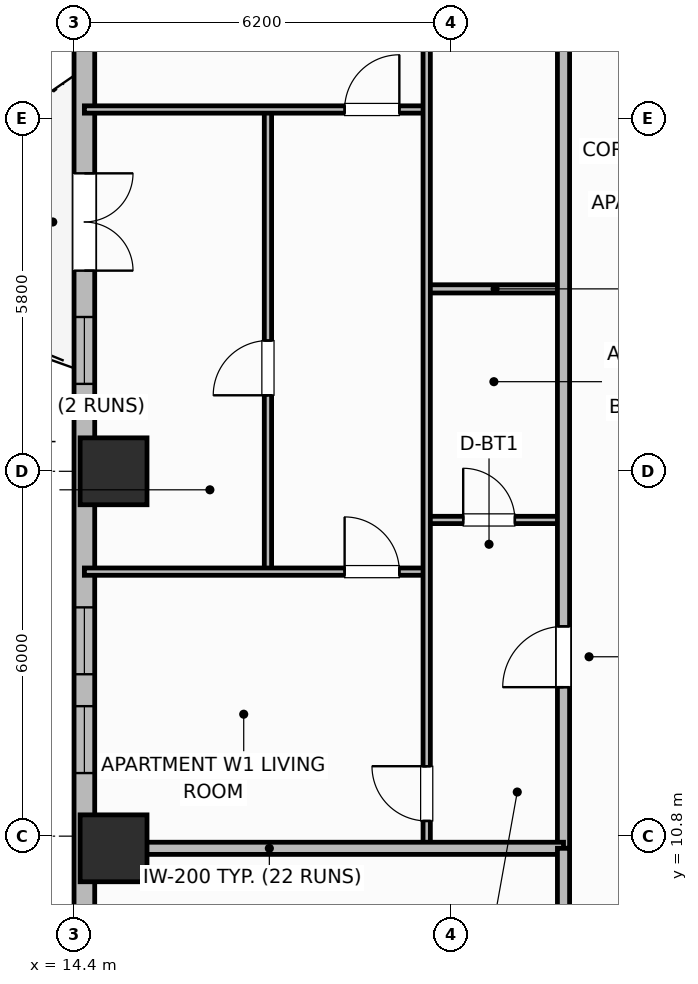
"""IFC4 building model, lengths in metres.
Left out: names, types, materials, properties, quantities, classifications, styles, units other than length and angle.
Written with IfcOpenShell. Run it as: python <this file> out.ifc"""

import sys

from ifc_helpers import new_model, si_unit, direction, frame, frame_2d, origin, origin_2d, place, context, subcontext, project, spatial, rectangle, extrude, element, fill, save


model = new_model("IFC4")
c1 = context("Model", 3, precision=1e-05, world=origin(), true_north=direction((0.0, 1.0)))
c2 = subcontext(c1, "Body", "Model", "MODEL_VIEW")
j1 = project(units=[si_unit("LENGTHUNIT", "METRE"), si_unit("PLANEANGLEUNIT", "RADIAN")], contexts=[c1])
p1 = place(None, origin())
s1 = spatial("IfcSite", under=j1, at=p1, CompositionType="ELEMENT")
p2 = place(p1, origin())
s2 = spatial("IfcBuilding", under=s1, at=p2, CompositionType="ELEMENT")
p3 = place(p2, frame((0.0, 0.0, 132.7)))
s3 = spatial("IfcBuildingStorey", under=s2, at=p3, CompositionType="ELEMENT", Elevation=132.7)
for number, where, z_axis, x_axis in (
    (1, (15.05, 10.6, 0.0), (0.0, 0.0, 1.0), (1.0, 0.0, 0.0)),
    (2, (15.05, 16.8, 0.0), (0.0, 0.0, 1.0), (1.0, 0.0, 0.0)),
):
    element("IfcColumn", number, at=place(p3, frame(where, z_axis=z_axis, x_axis=x_axis)), inside=s3, PredefinedType="COLUMN", context=c2, shape_type="SweptSolid", body=[
        extrude(rectangle(XDim=1.1, YDim=1.1, at=origin_2d()), origin(), (0.0, 0.0, 1.0), 3.7),
    ])
p4 = place(p3, frame((14.57, 23.8, 0.0), z_axis=(0.0, 0.0, 1.0), x_axis=(0.0, -1.0, 0.0)))
e3 = element("IfcWall", 3, at=p4, inside=s3, PredefinedType="SOLIDWALL", context=c2, shape_type="SweptSolid", body=[
    extrude(rectangle(XDim=14.8, YDim=0.34, at=frame_2d((7.4, 0.0))), origin(), (0.0, 0.0, 1.0), 2.66),
])
p5 = place(p4, frame((2.1, 0.0, 0.0)))
e4 = element("IfcOpeningElement", 4, at=p5, cuts=e3, PredefinedType="OPENING", context=c2, shape_type="SweptSolid", body=[
    extrude(rectangle(XDim=1.6, YDim=2.1, at=frame_2d((0.8, 1.05))), frame((0.0, 0.18, 0.0), z_axis=(0.0, -1.0, 0.0), x_axis=(1.0, 0.0, 0.0)), (0.0, 0.0, 1.0), 0.36),
])
p6 = place(p4, frame((4.462, 0.0, 0.89)))
e5 = element("IfcOpeningElement", 5, at=p6, cuts=e3, PredefinedType="OPENING", context=c2, shape_type="SweptSolid", body=[
    extrude(rectangle(XDim=1.1, YDim=1.65, at=frame_2d((0.55, 0.825))), frame((0.0, 0.18, 0.0), z_axis=(0.0, -1.0, 0.0), x_axis=(1.0, 0.0, 0.0)), (0.0, 0.0, 1.0), 0.36),
])
p7 = place(p4, frame((9.238, 0.0, 0.89)))
e6 = element("IfcOpeningElement", 6, at=p7, cuts=e3, PredefinedType="OPENING", context=c2, shape_type="SweptSolid", body=[
    extrude(rectangle(XDim=1.1, YDim=1.65, at=frame_2d((0.55, 0.825))), frame((0.0, 0.18, 0.0), z_axis=(0.0, -1.0, 0.0), x_axis=(1.0, 0.0, 0.0)), (0.0, 0.0, 1.0), 0.36),
])
p8 = place(p4, frame((10.863, 0.0, 0.89)))
e7 = element("IfcOpeningElement", 7, at=p8, cuts=e3, PredefinedType="OPENING", context=c2, shape_type="SweptSolid", body=[
    extrude(rectangle(XDim=1.1, YDim=1.65, at=frame_2d((0.55, 0.825))), frame((0.0, 0.18, 0.0), z_axis=(0.0, -1.0, 0.0), x_axis=(1.0, 0.0, 0.0)), (0.0, 0.0, 1.0), 0.36),
])
p9 = place(p3, frame((20.2, 16.0, 0.0), z_axis=(0.0, 0.0, 1.0), x_axis=(1.0, 0.0, 0.0)))
e8 = element("IfcWall", 8, at=p9, inside=s3, PredefinedType="PARTITIONING", context=c2, shape_type="SweptSolid", body=[
    extrude(rectangle(XDim=2.25, YDim=0.12, at=frame_2d((1.125, 0.0))), origin(), (0.0, 0.0, 1.0), 2.49),
])
p10 = place(p9, frame((0.6, 0.0, 0.0)))
e9 = element("IfcOpeningElement", 9, at=p10, cuts=e8, PredefinedType="OPENING", context=c2, shape_type="SweptSolid", body=[
    extrude(rectangle(XDim=0.85, YDim=2.1, at=frame_2d((0.425, 1.05))), frame((0.0, 0.07, 0.0), z_axis=(0.0, -1.0, 0.0), x_axis=(1.0, 0.0, 0.0)), (0.0, 0.0, 1.0), 0.14),
])
p11 = place(p3, frame((20.2, 19.8, 0.0), z_axis=(0.0, 0.0, 1.0), x_axis=(1.0, 0.0, 0.0)))
e10 = element("IfcWall", 10, at=p11, inside=s3, PredefinedType="PARTITIONING", context=c2, shape_type="SweptSolid", body=[
    extrude(rectangle(XDim=2.25, YDim=0.135, at=frame_2d((1.125, 0.0))), origin(), (0.0, 0.0, 1.0), 2.49),
])
p12 = place(p3, frame((17.589, 15.19, 0.0), z_axis=(0.0, 0.0, 1.0), x_axis=(0.0, 1.0, 0.0)))
e11 = element("IfcWall", 11, at=p12, inside=s3, PredefinedType="PARTITIONING", context=c2, shape_type="SweptSolid", body=[
    extrude(rectangle(XDim=7.52, YDim=0.12, at=frame_2d((3.76, 0.0))), origin(), (0.0, 0.0, 1.0), 2.49),
])
p13 = place(p12, frame((2.86, 0.0, 0.0)))
e12 = element("IfcOpeningElement", 12, at=p13, cuts=e11, PredefinedType="OPENING", context=c2, shape_type="SweptSolid", body=[
    extrude(rectangle(XDim=0.9, YDim=2.1, at=frame_2d((0.45, 1.05))), frame((0.0, 0.07, 0.0), z_axis=(0.0, -1.0, 0.0), x_axis=(1.0, 0.0, 0.0)), (0.0, 0.0, 1.0), 0.14),
])
p14 = place(p3, frame((14.57, 15.15, 0.0), z_axis=(0.0, 0.0, 1.0), x_axis=(1.0, 0.0, 0.0)))
e13 = element("IfcWall", 13, at=p14, inside=s3, PredefinedType="PARTITIONING", context=c2, shape_type="SweptSolid", body=[
    extrude(rectangle(XDim=5.63, YDim=0.12, at=frame_2d((2.815, 0.0))), origin(), (0.0, 0.0, 1.0), 2.49),
])
p15 = place(p14, frame((4.28, 0.0, 0.0)))
e14 = element("IfcOpeningElement", 14, at=p15, cuts=e13, PredefinedType="OPENING", context=c2, shape_type="SweptSolid", body=[
    extrude(rectangle(XDim=0.9, YDim=2.1, at=frame_2d((0.45, 1.05))), frame((0.0, 0.07, 0.0), z_axis=(0.0, -1.0, 0.0), x_axis=(1.0, 0.0, 0.0)), (0.0, 0.0, 1.0), 0.14),
])
p16 = place(p3, frame((14.57, 22.75, 0.0), z_axis=(0.0, 0.0, 1.0), x_axis=(1.0, 0.0, 0.0)))
e15 = element("IfcWall", 15, at=p16, inside=s3, PredefinedType="PARTITIONING", context=c2, shape_type="SweptSolid", body=[
    extrude(rectangle(XDim=5.63, YDim=0.12, at=frame_2d((2.815, 0.0))), origin(), (0.0, 0.0, 1.0), 2.49),
])
p17 = place(p16, frame((4.28, 0.0, 0.0)))
e16 = element("IfcOpeningElement", 16, at=p17, cuts=e15, PredefinedType="OPENING", context=c2, shape_type="SweptSolid", body=[
    extrude(rectangle(XDim=0.9, YDim=2.1, at=frame_2d((0.45, 1.05))), frame((0.0, 0.07, 0.0), z_axis=(0.0, -1.0, 0.0), x_axis=(1.0, 0.0, 0.0)), (0.0, 0.0, 1.0), 0.14),
])
p18 = place(p3, frame((20.2, 10.64, 0.0), z_axis=(0.0, 0.0, 1.0), x_axis=(0.0, 1.0, 0.0)))
e17 = element("IfcWall", 17, at=p18, inside=s3, PredefinedType="PARTITIONING", context=c2, shape_type="SweptSolid", body=[
    extrude(rectangle(XDim=15.92, YDim=0.12, at=frame_2d((7.96, 0.0))), origin(), (0.0, 0.0, 1.0), 2.49),
])
p19 = place(p18, frame((0.41, 0.0, 0.0)))
e18 = element("IfcOpeningElement", 18, at=p19, cuts=e17, PredefinedType="OPENING", context=c2, shape_type="SweptSolid", body=[
    extrude(rectangle(XDim=0.9, YDim=2.1, at=frame_2d((0.45, 1.05))), frame((0.0, 0.07, 0.0), z_axis=(0.0, -1.0, 0.0), x_axis=(1.0, 0.0, 0.0)), (0.0, 0.0, 1.0), 0.14),
])
p20 = place(p18, frame((13.125, 0.0, 0.0)))
e19 = element("IfcOpeningElement", 19, at=p20, cuts=e17, PredefinedType="OPENING", context=c2, shape_type="SweptSolid", body=[
    extrude(rectangle(XDim=0.82, YDim=2.08, at=frame_2d((0.41, 1.04))), frame((0.0, 0.07, 0.0), z_axis=(0.0, -1.0, 0.0), x_axis=(1.0, 0.0, 0.0)), (0.0, 0.0, 1.0), 0.14),
])
p21 = place(p3, frame((22.45, 10.6, 0.0), z_axis=(0.0, 0.0, 1.0), x_axis=(0.0, 1.0, 0.0)))
e20 = element("IfcWall", 20, at=p21, inside=s3, PredefinedType="PARTITIONING", context=c2, shape_type="SweptSolid", body=[
    extrude(rectangle(XDim=35.2, YDim=0.2, at=frame_2d((17.6, 0.0))), origin(), (0.0, 0.0, 1.0), 2.49),
])
p22 = place(p21, frame((2.65, 0.0, 0.0)))
e21 = element("IfcOpeningElement", 21, at=p22, cuts=e20, PredefinedType="OPENING", context=c2, shape_type="SweptSolid", body=[
    extrude(rectangle(XDim=1.0, YDim=2.15, at=frame_2d((0.5, 1.075))), frame((0.0, 0.11, 0.0), z_axis=(0.0, -1.0, 0.0), x_axis=(1.0, 0.0, 0.0)), (0.0, 0.0, 1.0), 0.22),
])
p23 = place(p21, frame((19.95, 0.0, 0.0)))
e22 = element("IfcOpeningElement", 22, at=p23, cuts=e20, PredefinedType="OPENING", context=c2, shape_type="SweptSolid", body=[
    extrude(rectangle(XDim=1.0, YDim=2.15, at=frame_2d((0.5, 1.075))), frame((0.0, 0.11, 0.0), z_axis=(0.0, -1.0, 0.0), x_axis=(1.0, 0.0, 0.0)), (0.0, 0.0, 1.0), 0.22),
])
p24 = place(p3, frame((14.99, 10.6, 0.0), z_axis=(0.0, 0.0, 1.0), x_axis=(1.0, 0.0, 0.0)))
e23 = element("IfcWall", 23, at=p24, inside=s3, PredefinedType="PARTITIONING", context=c2, shape_type="SweptSolid", body=[
    extrude(rectangle(XDim=7.46, YDim=0.2, at=frame_2d((3.73, 0.0))), origin(), (0.0, 0.0, 1.0), 2.49),
])
p25 = place(p3, frame((22.45, 4.97, 0.0), z_axis=(0.0, 0.0, 1.0), x_axis=(0.0, 1.0, 0.0)))
e24 = element("IfcWall", 24, at=p25, inside=s3, PredefinedType="PARTITIONING", context=c2, shape_type="SweptSolid", body=[
    extrude(rectangle(XDim=5.63, YDim=0.2, at=frame_2d((2.815, 0.0))), origin(), (0.0, 0.0, 1.0), 2.49),
])
p26 = place(p5, origin())
e25 = element("IfcDoor", 25, at=p26, inside=s3, OperationType="DOUBLE_DOOR_SINGLE_SWING", PredefinedType="DOOR", context=c2, shape_type="SweptSolid", body=[
    extrude(rectangle(XDim=1.6, YDim=2.1, at=frame_2d((0.8, 1.05))), frame((0.0, 0.025, 0.0), z_axis=(0.0, -1.0, 0.0), x_axis=(1.0, 0.0, 0.0)), (0.0, 0.0, 1.0), 0.05),
])
fill(e4, e25)
p27 = place(p6, origin())
e26 = element("IfcWindow", 26, at=p27, inside=s3, PartitioningType="SINGLE_PANEL", PredefinedType="WINDOW", context=c2, shape_type="SweptSolid", body=[
    extrude(rectangle(XDim=1.1, YDim=1.65, at=frame_2d((0.55, 0.825))), frame((0.0, 0.03, 0.0), z_axis=(0.0, -1.0, 0.0), x_axis=(1.0, 0.0, 0.0)), (0.0, 0.0, 1.0), 0.06),
])
fill(e5, e26)
p28 = place(p7, origin())
e27 = element("IfcWindow", 27, at=p28, inside=s3, PartitioningType="SINGLE_PANEL", PredefinedType="WINDOW", context=c2, shape_type="SweptSolid", body=[
    extrude(rectangle(XDim=1.1, YDim=1.65, at=frame_2d((0.55, 0.825))), frame((0.0, 0.03, 0.0), z_axis=(0.0, -1.0, 0.0), x_axis=(1.0, 0.0, 0.0)), (0.0, 0.0, 1.0), 0.06),
])
fill(e6, e27)
p29 = place(p8, origin())
e28 = element("IfcWindow", 28, at=p29, inside=s3, PartitioningType="SINGLE_PANEL", PredefinedType="WINDOW", context=c2, shape_type="SweptSolid", body=[
    extrude(rectangle(XDim=1.1, YDim=1.65, at=frame_2d((0.55, 0.825))), frame((0.0, 0.03, 0.0), z_axis=(0.0, -1.0, 0.0), x_axis=(1.0, 0.0, 0.0)), (0.0, 0.0, 1.0), 0.06),
])
fill(e7, e28)
p30 = place(p10, origin())
e29 = element("IfcDoor", 29, at=p30, inside=s3, OperationType="SINGLE_SWING_LEFT", PredefinedType="DOOR", context=c2, shape_type="SweptSolid", body=[
    extrude(rectangle(XDim=0.85, YDim=2.1, at=frame_2d((0.425, 1.05))), frame((0.0, 0.025, 0.0), z_axis=(0.0, -1.0, 0.0), x_axis=(1.0, 0.0, 0.0)), (0.0, 0.0, 1.0), 0.05),
])
fill(e9, e29)
p31 = place(p13, origin())
e30 = element("IfcDoor", 30, at=p31, inside=s3, OperationType="SINGLE_SWING_LEFT", PredefinedType="DOOR", context=c2, shape_type="SweptSolid", body=[
    extrude(rectangle(XDim=0.9, YDim=2.1, at=frame_2d((0.45, 1.05))), frame((0.0, 0.025, 0.0), z_axis=(0.0, -1.0, 0.0), x_axis=(1.0, 0.0, 0.0)), (0.0, 0.0, 1.0), 0.05),
])
fill(e12, e30)
p32 = place(p15, origin())
e31 = element("IfcDoor", 31, at=p32, inside=s3, OperationType="SINGLE_SWING_LEFT", PredefinedType="DOOR", context=c2, shape_type="SweptSolid", body=[
    extrude(rectangle(XDim=0.9, YDim=2.1, at=frame_2d((0.45, 1.05))), frame((0.0, 0.025, 0.0), z_axis=(0.0, -1.0, 0.0), x_axis=(1.0, 0.0, 0.0)), (0.0, 0.0, 1.0), 0.05),
])
fill(e14, e31)
p33 = place(p17, origin())
e32 = element("IfcDoor", 32, at=p33, inside=s3, OperationType="SINGLE_SWING_RIGHT", PredefinedType="DOOR", context=c2, shape_type="SweptSolid", body=[
    extrude(rectangle(XDim=0.9, YDim=2.1, at=frame_2d((0.45, 1.05))), frame((0.0, 0.025, 0.0), z_axis=(0.0, -1.0, 0.0), x_axis=(1.0, 0.0, 0.0)), (0.0, 0.0, 1.0), 0.05),
])
fill(e16, e32)
p34 = place(p19, origin())
e33 = element("IfcDoor", 33, at=p34, inside=s3, OperationType="SINGLE_SWING_RIGHT", PredefinedType="DOOR", context=c2, shape_type="SweptSolid", body=[
    extrude(rectangle(XDim=0.9, YDim=2.1, at=frame_2d((0.45, 1.05))), frame((0.0, 0.025, 0.0), z_axis=(0.0, -1.0, 0.0), x_axis=(1.0, 0.0, 0.0)), (0.0, 0.0, 1.0), 0.05),
])
fill(e18, e33)
p35 = place(p22, origin())
e34 = element("IfcDoor", 34, at=p35, inside=s3, OperationType="SINGLE_SWING_LEFT", PredefinedType="DOOR", context=c2, shape_type="SweptSolid", body=[
    extrude(rectangle(XDim=1.0, YDim=2.15, at=frame_2d((0.5, 1.075))), frame((0.0, 0.025, 0.0), z_axis=(0.0, -1.0, 0.0), x_axis=(1.0, 0.0, 0.0)), (0.0, 0.0, 1.0), 0.05),
])
fill(e21, e34)
save(model, sys.argv[1])
